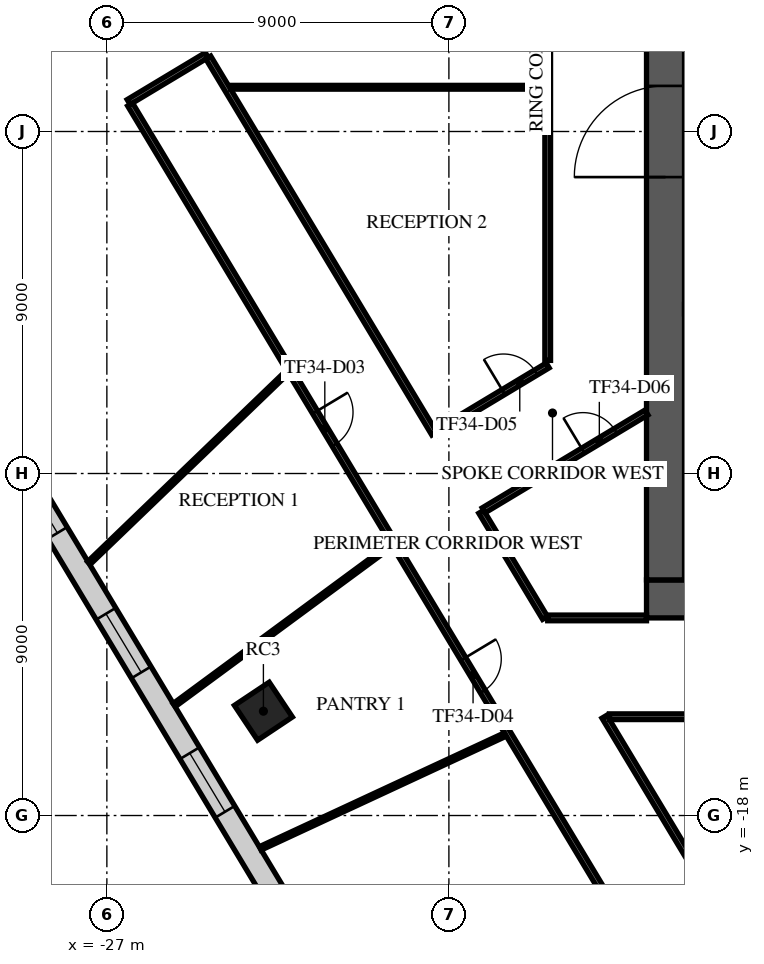
"""IFC4 building model, lengths in metres.
Left out: names, types, materials, properties, quantities, classifications, styles, units other than length and angle.
Written with IfcOpenShell. Run it as: python <this file> out.ifc"""

import sys

from ifc_helpers import new_model, si_unit, direction, frame, frame_2d, origin, origin_2d, place, context, subcontext, project, spatial, rectangle, extrude, element, fill, save


model = new_model("IFC4")
c1 = context("Model", 3, precision=1e-05, world=origin(), true_north=direction((0.0, 1.0)))
c2 = subcontext(c1, "Body", "Model", "MODEL_VIEW")
j1 = project(units=[si_unit("LENGTHUNIT", "METRE"), si_unit("PLANEANGLEUNIT", "RADIAN")], contexts=[c1])
p1 = place(None, origin())
s1 = spatial("IfcSite", under=j1, at=p1, CompositionType="ELEMENT")
p2 = place(p1, origin())
s2 = spatial("IfcBuilding", under=s1, at=p2, CompositionType="ELEMENT")
p3 = place(p2, frame((0.0, 0.0, 147.7)))
s3 = spatial("IfcBuildingStorey", under=s2, at=p3, CompositionType="ELEMENT", Elevation=147.7)
p4 = place(p3, frame((-22.881, -15.255, 0.0), z_axis=(0.0, 0.0, 1.0), x_axis=(0.832028680356, 0.55473261583, 0.0)))
e1 = element("IfcColumn", 1, at=p4, inside=s3, PredefinedType="COLUMN", context=c2, shape_type="SweptSolid", body=[
    extrude(rectangle(XDim=1.1, YDim=1.1, at=origin_2d()), origin(), (0.0, 0.0, 1.0), 4.0),
])
p5 = place(p3, frame((-12.8, -12.3, 0.0), z_axis=(0.0, 0.0, 1.0), x_axis=(1.0, 0.0, 0.0)))
e2 = element("IfcWall", 2, at=p5, inside=s3, PredefinedType="SHEAR", context=c2, shape_type="SweptSolid", body=[
    extrude(rectangle(XDim=25.6, YDim=1.0, at=frame_2d((12.8, 0.0))), origin(), (0.0, 0.0, 1.0), 3.6),
])
p6 = place(p5, frame((7.7, 0.0, 0.0)))
e3 = element("IfcOpeningElement", 3, at=p6, cuts=e2, PredefinedType="OPENING", context=c2, shape_type="SweptSolid", body=[
    extrude(rectangle(XDim=2.0, YDim=2.1, at=frame_2d((1.0, 1.05))), frame((0.0, 0.51, 0.0), z_axis=(0.0, -1.0, 0.0), x_axis=(1.0, 0.0, 0.0)), (0.0, 0.0, 1.0), 1.02),
])
p7 = place(p5, frame((17.825, 0.0, 0.0)))
e4 = element("IfcOpeningElement", 4, at=p7, cuts=e2, PredefinedType="OPENING", context=c2, shape_type="SweptSolid", body=[
    extrude(rectangle(XDim=1.2, YDim=2.1, at=frame_2d((0.6, 1.05))), frame((0.0, 0.51, 0.0), z_axis=(0.0, -1.0, 0.0), x_axis=(1.0, 0.0, 0.0)), (0.0, 0.0, 1.0), 1.02),
])
p8 = place(p5, frame((1.975, 0.0, 0.0)))
e5 = element("IfcOpeningElement", 5, at=p8, cuts=e2, PredefinedType="OPENING", context=c2, shape_type="SweptSolid", body=[
    extrude(rectangle(XDim=1.2, YDim=2.1, at=frame_2d((0.6, 1.05))), frame((0.0, 0.51, 0.0), z_axis=(0.0, -1.0, 0.0), x_axis=(1.0, 0.0, 0.0)), (0.0, 0.0, 1.0), 1.02),
])
p9 = place(p5, frame((22.425, 0.0, 0.0)))
e6 = element("IfcOpeningElement", 6, at=p9, cuts=e2, PredefinedType="OPENING", context=c2, shape_type="SweptSolid", body=[
    extrude(rectangle(XDim=1.2, YDim=2.1, at=frame_2d((0.6, 1.05))), frame((0.0, 0.51, 0.0), z_axis=(0.0, -1.0, 0.0), x_axis=(1.0, 0.0, 0.0)), (0.0, 0.0, 1.0), 1.02),
])
p10 = place(p3, frame((-12.3, -11.8, 0.0), z_axis=(0.0, 0.0, 1.0), x_axis=(0.0, 1.0, 0.0)))
e7 = element("IfcWall", 7, at=p10, inside=s3, PredefinedType="SHEAR", context=c2, shape_type="SweptSolid", body=[
    extrude(rectangle(XDim=23.6, YDim=1.0, at=frame_2d((11.8, 0.0))), origin(), (0.0, 0.0, 1.0), 3.6),
])
p11 = place(p10, frame((10.6, 0.0, 0.0)))
e8 = element("IfcOpeningElement", 8, at=p11, cuts=e7, PredefinedType="OPENING", context=c2, shape_type="SweptSolid", body=[
    extrude(rectangle(XDim=2.4, YDim=2.4, at=frame_2d((1.2, 1.2))), frame((0.0, 0.51, 0.0), z_axis=(0.0, -1.0, 0.0), x_axis=(1.0, 0.0, 0.0)), (0.0, 0.0, 1.0), 1.02),
])
p12 = place(p3, frame((-8.65, -4.675, 0.0), z_axis=(0.0, 0.0, 1.0), x_axis=(-1.0, 0.0, 0.0)))
e9 = element("IfcWall", 9, at=p12, inside=s3, PredefinedType="SOLIDWALL", context=c2, shape_type="SweptSolid", body=[
    extrude(rectangle(XDim=3.15, YDim=0.25, at=frame_2d((1.575, 0.0))), origin(), (0.0, 0.0, 1.0), 3.6),
])
p13 = place(p3, frame((-36.416, 2.94, 0.0), z_axis=(0.0, 0.0, 1.0), x_axis=(0.515041561016, -0.857165206029, 0.0)))
e10 = element("IfcWall", 10, at=p13, inside=s3, PredefinedType="STANDARD", context=c2, shape_type="SweptSolid", body=[
    extrude(rectangle(XDim=42.552, YDim=0.6, at=frame_2d((21.276, 0.0))), origin(), (0.0, 0.0, 1.0), 3.6),
])
p14 = place(p13, frame((1.178, 0.0, 0.9)))
e11 = element("IfcOpeningElement", 11, at=p14, cuts=e10, PredefinedType="OPENING", context=c2, shape_type="SweptSolid", body=[
    extrude(rectangle(XDim=1.8, YDim=2.1, at=frame_2d((0.9, 1.05))), frame((0.0, 0.31, 0.0), z_axis=(0.0, -1.0, 0.0), x_axis=(1.0, 0.0, 0.0)), (0.0, 0.0, 1.0), 0.62),
])
p15 = place(p13, frame((5.396, 0.0, 0.9)))
e12 = element("IfcOpeningElement", 12, at=p15, cuts=e10, PredefinedType="OPENING", context=c2, shape_type="SweptSolid", body=[
    extrude(rectangle(XDim=1.8, YDim=2.1, at=frame_2d((0.9, 1.05))), frame((0.0, 0.31, 0.0), z_axis=(0.0, -1.0, 0.0), x_axis=(1.0, 0.0, 0.0)), (0.0, 0.0, 1.0), 0.62),
])
p16 = place(p13, frame((9.676, 0.0, 0.9)))
e13 = element("IfcOpeningElement", 13, at=p16, cuts=e10, PredefinedType="OPENING", context=c2, shape_type="SweptSolid", body=[
    extrude(rectangle(XDim=1.8, YDim=2.1, at=frame_2d((0.9, 1.05))), frame((0.0, 0.31, 0.0), z_axis=(0.0, -1.0, 0.0), x_axis=(1.0, 0.0, 0.0)), (0.0, 0.0, 1.0), 0.62),
])
p17 = place(p13, frame((13.956, 0.0, 0.9)))
e14 = element("IfcOpeningElement", 14, at=p17, cuts=e10, PredefinedType="OPENING", context=c2, shape_type="SweptSolid", body=[
    extrude(rectangle(XDim=1.8, YDim=2.1, at=frame_2d((0.9, 1.05))), frame((0.0, 0.31, 0.0), z_axis=(0.0, -1.0, 0.0), x_axis=(1.0, 0.0, 0.0)), (0.0, 0.0, 1.0), 0.62),
])
p18 = place(p13, frame((18.236, 0.0, 0.9)))
e15 = element("IfcOpeningElement", 15, at=p18, cuts=e10, PredefinedType="OPENING", context=c2, shape_type="SweptSolid", body=[
    extrude(rectangle(XDim=1.8, YDim=2.1, at=frame_2d((0.9, 1.05))), frame((0.0, 0.31, 0.0), z_axis=(0.0, -1.0, 0.0), x_axis=(1.0, 0.0, 0.0)), (0.0, 0.0, 1.0), 0.62),
])
p19 = place(p13, frame((22.516, 0.0, 0.9)))
e16 = element("IfcOpeningElement", 16, at=p19, cuts=e10, PredefinedType="OPENING", context=c2, shape_type="SweptSolid", body=[
    extrude(rectangle(XDim=1.8, YDim=2.1, at=frame_2d((0.9, 1.05))), frame((0.0, 0.31, 0.0), z_axis=(0.0, -1.0, 0.0), x_axis=(1.0, 0.0, 0.0)), (0.0, 0.0, 1.0), 0.62),
])
p20 = place(p13, frame((26.796, 0.0, 0.9)))
e17 = element("IfcOpeningElement", 17, at=p20, cuts=e10, PredefinedType="OPENING", context=c2, shape_type="SweptSolid", body=[
    extrude(rectangle(XDim=1.8, YDim=2.1, at=frame_2d((0.9, 1.05))), frame((0.0, 0.31, 0.0), z_axis=(0.0, -1.0, 0.0), x_axis=(1.0, 0.0, 0.0)), (0.0, 0.0, 1.0), 0.62),
])
p21 = place(p13, frame((31.076, 0.0, 0.9)))
e18 = element("IfcOpeningElement", 18, at=p21, cuts=e10, PredefinedType="OPENING", context=c2, shape_type="SweptSolid", body=[
    extrude(rectangle(XDim=1.8, YDim=2.1, at=frame_2d((0.9, 1.05))), frame((0.0, 0.31, 0.0), z_axis=(0.0, -1.0, 0.0), x_axis=(1.0, 0.0, 0.0)), (0.0, 0.0, 1.0), 0.62),
])
p22 = place(p13, frame((35.356, 0.0, 0.9)))
e19 = element("IfcOpeningElement", 19, at=p22, cuts=e10, PredefinedType="OPENING", context=c2, shape_type="SweptSolid", body=[
    extrude(rectangle(XDim=1.8, YDim=2.1, at=frame_2d((0.9, 1.05))), frame((0.0, 0.31, 0.0), z_axis=(0.0, -1.0, 0.0), x_axis=(1.0, 0.0, 0.0)), (0.0, 0.0, 1.0), 0.62),
])
p23 = place(p13, frame((39.573, 0.0, 0.9)))
e20 = element("IfcOpeningElement", 20, at=p23, cuts=e10, PredefinedType="OPENING", context=c2, shape_type="SweptSolid", body=[
    extrude(rectangle(XDim=1.8, YDim=2.1, at=frame_2d((0.9, 1.05))), frame((0.0, 0.31, 0.0), z_axis=(0.0, -1.0, 0.0), x_axis=(1.0, 0.0, 0.0)), (0.0, 0.0, 1.0), 0.62),
])
p24 = place(p3, frame((-26.427, 0.775, 0.0), z_axis=(0.0, 0.0, 1.0), x_axis=(0.857133645358, 0.515094082664, 0.0)))
e21 = element("IfcWall", 21, at=p24, inside=s3, PredefinedType="PARTITIONING", context=c2, shape_type="SweptSolid", body=[
    extrude(rectangle(XDim=2.4, YDim=0.15, at=frame_2d((1.2, 0.0))), origin(), (0.0, 0.0, 1.0), 3.6),
])
p25 = place(p3, frame((-26.388, 0.711, 0.0), z_axis=(0.0, 0.0, 1.0), x_axis=(0.515060503771, -0.857153823684, 0.0)))
e22 = element("IfcWall", 22, at=p25, inside=s3, PredefinedType="PARTITIONING", context=c2, shape_type="SweptSolid", body=[
    extrude(rectangle(XDim=28.475, YDim=0.15, at=frame_2d((14.238, 0.0))), origin(), (0.0, 0.0, 1.0), 3.15),
])
p26 = place(p25, frame((9.447, 0.0, 0.0)))
e23 = element("IfcOpeningElement", 23, at=p26, cuts=e22, PredefinedType="OPENING", context=c2, shape_type="SweptSolid", body=[
    extrude(rectangle(XDim=1.0, YDim=2.1, at=frame_2d((0.5, 1.05))), frame((0.0, 0.085, 0.0), z_axis=(0.0, -1.0, 0.0), x_axis=(1.0, 0.0, 0.0)), (0.0, 0.0, 1.0), 0.17),
])
p27 = place(p25, frame((17.021, 0.0, 0.0)))
e24 = element("IfcOpeningElement", 24, at=p27, cuts=e22, PredefinedType="OPENING", context=c2, shape_type="SweptSolid", body=[
    extrude(rectangle(XDim=1.0, YDim=2.1, at=frame_2d((0.5, 1.05))), frame((0.0, 0.085, 0.0), z_axis=(0.0, -1.0, 0.0), x_axis=(1.0, 0.0, 0.0)), (0.0, 0.0, 1.0), 0.17),
])
p28 = place(p3, frame((-24.331, 1.947, 0.0), z_axis=(0.0, 0.0, 1.0), x_axis=(0.51502118809, -0.857177447101, 0.0)))
e25 = element("IfcWall", 25, at=p28, inside=s3, PredefinedType="PARTITIONING", context=c2, shape_type="SweptSolid", body=[
    extrude(rectangle(XDim=11.546, YDim=0.15, at=frame_2d((5.773, 0.0))), origin(), (0.0, 0.0, 1.0), 3.15),
])
p29 = place(p3, frame((-18.321, -7.911, 0.0), z_axis=(0.0, 0.0, 1.0), x_axis=(0.857126069009, 0.51510668975, 0.0)))
e26 = element("IfcWall", 26, at=p29, inside=s3, PredefinedType="PARTITIONING", context=c2, shape_type="SweptSolid", body=[
    extrude(rectangle(XDim=3.408, YDim=0.15, at=frame_2d((1.704, 0.0))), origin(), (0.0, 0.0, 1.0), 3.6),
])
p30 = place(p29, frame((2.05, 0.0, 0.0)))
e27 = element("IfcOpeningElement", 27, at=p30, cuts=e26, PredefinedType="OPENING", context=c2, shape_type="SweptSolid", body=[
    extrude(rectangle(XDim=1.0, YDim=2.1, at=frame_2d((0.5, 1.05))), frame((0.0, 0.085, 0.0), z_axis=(0.0, -1.0, 0.0), x_axis=(1.0, 0.0, 0.0)), (0.0, 0.0, 1.0), 0.17),
])
p31 = place(p3, frame((-17.149, -10.007, 0.0), z_axis=(0.0, 0.0, 1.0), x_axis=(0.515211704808, -0.857062949397, 0.0)))
e28 = element("IfcWall", 28, at=p31, inside=s3, PredefinedType="PARTITIONING", context=c2, shape_type="SweptSolid", body=[
    extrude(rectangle(XDim=3.259, YDim=0.15, at=frame_2d((1.629, 0.0))), origin(), (0.0, 0.0, 1.0), 3.15),
])
p32 = place(p3, frame((-17.085, -9.969, 0.0), z_axis=(0.0, 0.0, 1.0), x_axis=(0.857169540237, 0.515034347681, 0.0)))
e29 = element("IfcWall", 29, at=p32, inside=s3, PredefinedType="PARTITIONING", context=c2, shape_type="SweptSolid", body=[
    extrude(rectangle(XDim=4.999, YDim=0.15, at=frame_2d((2.499, 0.0))), origin(), (0.0, 0.0, 1.0), 3.15),
])
p33 = place(p32, frame((3.05, 0.0, 0.0)))
e30 = element("IfcOpeningElement", 30, at=p33, cuts=e29, PredefinedType="OPENING", context=c2, shape_type="SweptSolid", body=[
    extrude(rectangle(XDim=1.0, YDim=2.1, at=frame_2d((0.5, 1.05))), frame((0.0, 0.085, 0.0), z_axis=(0.0, -1.0, 0.0), x_axis=(1.0, 0.0, 0.0)), (0.0, 0.0, 1.0), 0.17),
])
p34 = place(p3, frame((-15.4, -12.8, 0.0), z_axis=(0.0, 0.0, 1.0), x_axis=(1.0, 0.0, 0.0)))
e31 = element("IfcWall", 31, at=p34, inside=s3, PredefinedType="PARTITIONING", context=c2, shape_type="SweptSolid", body=[
    extrude(rectangle(XDim=2.6, YDim=0.15, at=frame_2d((1.3, 0.0))), origin(), (0.0, 0.0, 1.0), 3.03),
])
p35 = place(p3, frame((-15.4, -6.023, 0.0), z_axis=(0.0, 0.0, 1.0), x_axis=(0.0, 1.0, 0.0)))
e32 = element("IfcWall", 32, at=p35, inside=s3, PredefinedType="PARTITIONING", context=c2, shape_type="SweptSolid", body=[
    extrude(rectangle(XDim=16.023, YDim=0.15, at=frame_2d((8.012, 0.0))), origin(), (0.0, 0.0, 1.0), 3.15),
])
p36 = place(p3, frame((-13.908, -15.4, 0.0), z_axis=(0.0, 0.0, 1.0), x_axis=(0.515057872285, -0.857155404928, 0.0)))
e33 = element("IfcWall", 33, at=p36, inside=s3, PredefinedType="PARTITIONING", context=c2, shape_type="SweptSolid", body=[
    extrude(rectangle(XDim=8.238, YDim=0.15, at=frame_2d((4.119, 0.0))), origin(), (0.0, 0.0, 1.0), 3.15),
])
p37 = place(p36, frame((4.3, 0.0, 0.0)))
e34 = element("IfcOpeningElement", 34, at=p37, cuts=e33, PredefinedType="OPENING", context=c2, shape_type="SweptSolid", body=[
    extrude(rectangle(XDim=1.0, YDim=2.1, at=frame_2d((0.5, 1.05))), frame((0.0, 0.085, 0.0), z_axis=(0.0, -1.0, 0.0), x_axis=(1.0, 0.0, 0.0)), (0.0, 0.0, 1.0), 0.17),
])
p38 = place(p3, frame((-13.775, -15.4, 0.0), z_axis=(0.0, 0.0, 1.0), x_axis=(1.0, 0.0, 0.0)))
e35 = element("IfcWall", 35, at=p38, inside=s3, PredefinedType="PARTITIONING", context=c2, shape_type="SweptSolid", body=[
    extrude(rectangle(XDim=19.917, YDim=0.15, at=frame_2d((9.958, 0.0))), origin(), (0.0, 0.0, 1.0), 3.15),
])
p39 = place(p38, frame((5.05, 0.0, 0.0)))
e36 = element("IfcOpeningElement", 36, at=p39, cuts=e35, PredefinedType="OPENING", context=c2, shape_type="SweptSolid", body=[
    extrude(rectangle(XDim=1.8, YDim=2.1, at=frame_2d((0.9, 1.05))), frame((0.0, 0.085, 0.0), z_axis=(0.0, -1.0, 0.0), x_axis=(1.0, 0.0, 0.0)), (0.0, 0.0, 1.0), 0.17),
])
p40 = place(p38, frame((13.11, 0.0, 0.0)))
e37 = element("IfcOpeningElement", 37, at=p40, cuts=e35, PredefinedType="OPENING", context=c2, shape_type="SweptSolid", body=[
    extrude(rectangle(XDim=1.0, YDim=2.1, at=frame_2d((0.5, 1.05))), frame((0.0, 0.085, 0.0), z_axis=(0.0, -1.0, 0.0), x_axis=(1.0, 0.0, 0.0)), (0.0, 0.0, 1.0), 0.17),
])
p41 = place(p3, frame((-27.473, -11.357, 0.0), z_axis=(0.0, 0.0, 1.0), x_axis=(0.720430003107, 0.693527656711, 0.0)))
e38 = element("IfcWall", 38, at=p41, inside=s3, PredefinedType="PARTITIONING", context=c2, shape_type="SweptSolid", body=[
    extrude(rectangle(XDim=7.242, YDim=0.1, at=frame_2d((3.621, 0.0))), origin(), (0.0, 0.0, 1.0), 2.9),
])
p42 = place(p3, frame((-25.228, -15.094, 0.0), z_axis=(0.0, 0.0, 1.0), x_axis=(0.805036814034, 0.593224854545, 0.0)))
e39 = element("IfcWall", 39, at=p42, inside=s3, PredefinedType="PARTITIONING", context=c2, shape_type="SweptSolid", body=[
    extrude(rectangle(XDim=7.097, YDim=0.1, at=frame_2d((3.548, 0.0))), origin(), (0.0, 0.0, 1.0), 2.9),
])
p43 = place(p3, frame((-23.743, 1.164, 0.0), z_axis=(0.0, 0.0, 1.0), x_axis=(1.0, 0.0, 0.0)))
e40 = element("IfcWall", 40, at=p43, inside=s3, PredefinedType="PARTITIONING", context=c2, shape_type="SweptSolid", body=[
    extrude(rectangle(XDim=8.268, YDim=0.1, at=frame_2d((4.134, 0.0))), origin(), (0.0, 0.0, 1.0), 3.6),
])
p44 = place(p3, frame((-22.962, -18.864, 0.0), z_axis=(0.0, 0.0, 1.0), x_axis=(0.906871101806, 0.421408121313, 0.0)))
e41 = element("IfcWall", 41, at=p44, inside=s3, PredefinedType="PARTITIONING", context=c2, shape_type="SweptSolid", body=[
    extrude(rectangle(XDim=7.104, YDim=0.1, at=frame_2d((3.552, 0.0))), origin(), (0.0, 0.0, 1.0), 2.9),
])
p45 = place(p11, origin())
e42 = element("IfcDoor", 42, at=p45, inside=s3, OperationType="SINGLE_SWING_LEFT", PredefinedType="DOOR", context=c2, shape_type="SweptSolid", body=[
    extrude(rectangle(XDim=2.4, YDim=2.4, at=frame_2d((1.2, 1.2))), frame((0.0, 0.025, 0.0), z_axis=(0.0, -1.0, 0.0), x_axis=(1.0, 0.0, 0.0)), (0.0, 0.0, 1.0), 0.05),
])
fill(e8, e42)
p46 = place(p17, origin())
e43 = element("IfcWindow", 43, at=p46, inside=s3, PartitioningType="SINGLE_PANEL", PredefinedType="WINDOW", context=c2, shape_type="SweptSolid", body=[
    extrude(rectangle(XDim=1.8, YDim=2.1, at=frame_2d((0.9, 1.05))), frame((0.0, 0.03, 0.0), z_axis=(0.0, -1.0, 0.0), x_axis=(1.0, 0.0, 0.0)), (0.0, 0.0, 1.0), 0.06),
])
fill(e14, e43)
p47 = place(p18, origin())
e44 = element("IfcWindow", 44, at=p47, inside=s3, PartitioningType="SINGLE_PANEL", PredefinedType="WINDOW", context=c2, shape_type="SweptSolid", body=[
    extrude(rectangle(XDim=1.8, YDim=2.1, at=frame_2d((0.9, 1.05))), frame((0.0, 0.03, 0.0), z_axis=(0.0, -1.0, 0.0), x_axis=(1.0, 0.0, 0.0)), (0.0, 0.0, 1.0), 0.06),
])
fill(e15, e44)
p48 = place(p19, origin())
e45 = element("IfcWindow", 45, at=p48, inside=s3, PartitioningType="SINGLE_PANEL", PredefinedType="WINDOW", context=c2, shape_type="SweptSolid", body=[
    extrude(rectangle(XDim=1.8, YDim=2.1, at=frame_2d((0.9, 1.05))), frame((0.0, 0.03, 0.0), z_axis=(0.0, -1.0, 0.0), x_axis=(1.0, 0.0, 0.0)), (0.0, 0.0, 1.0), 0.06),
])
fill(e16, e45)
p49 = place(p26, frame((1.0, 0.0, 0.0), z_axis=(0.0, 0.0, 1.0), x_axis=(-1.0, 0.0, 0.0)))
e46 = element("IfcDoor", 46, at=p49, inside=s3, OperationType="SINGLE_SWING_RIGHT", PredefinedType="DOOR", context=c2, shape_type="SweptSolid", body=[
    extrude(rectangle(XDim=1.0, YDim=2.1, at=frame_2d((0.5, 1.05))), frame((0.0, 0.025, 0.0), z_axis=(0.0, -1.0, 0.0), x_axis=(1.0, 0.0, 0.0)), (0.0, 0.0, 1.0), 0.05),
])
fill(e23, e46)
p50 = place(p27, frame((1.0, 0.0, 0.0), z_axis=(0.0, 0.0, 1.0), x_axis=(-1.0, 0.0, 0.0)))
e47 = element("IfcDoor", 47, at=p50, inside=s3, OperationType="SINGLE_SWING_LEFT", PredefinedType="DOOR", context=c2, shape_type="SweptSolid", body=[
    extrude(rectangle(XDim=1.0, YDim=2.1, at=frame_2d((0.5, 1.05))), frame((0.0, 0.025, 0.0), z_axis=(0.0, -1.0, 0.0), x_axis=(1.0, 0.0, 0.0)), (0.0, 0.0, 1.0), 0.05),
])
fill(e24, e47)
p51 = place(p30, origin())
e48 = element("IfcDoor", 48, at=p51, inside=s3, OperationType="SINGLE_SWING_LEFT", PredefinedType="DOOR", context=c2, shape_type="SweptSolid", body=[
    extrude(rectangle(XDim=1.0, YDim=2.1, at=frame_2d((0.5, 1.05))), frame((0.0, 0.025, 0.0), z_axis=(0.0, -1.0, 0.0), x_axis=(1.0, 0.0, 0.0)), (0.0, 0.0, 1.0), 0.05),
])
fill(e27, e48)
p52 = place(p33, frame((1.0, 0.0, 0.0), z_axis=(0.0, 0.0, 1.0), x_axis=(-1.0, 0.0, 0.0)))
e49 = element("IfcDoor", 49, at=p52, inside=s3, OperationType="SINGLE_SWING_RIGHT", PredefinedType="DOOR", context=c2, shape_type="SweptSolid", body=[
    extrude(rectangle(XDim=1.0, YDim=2.1, at=frame_2d((0.5, 1.05))), frame((0.0, 0.025, 0.0), z_axis=(0.0, -1.0, 0.0), x_axis=(1.0, 0.0, 0.0)), (0.0, 0.0, 1.0), 0.05),
])
fill(e30, e49)
save(model, sys.argv[1])
